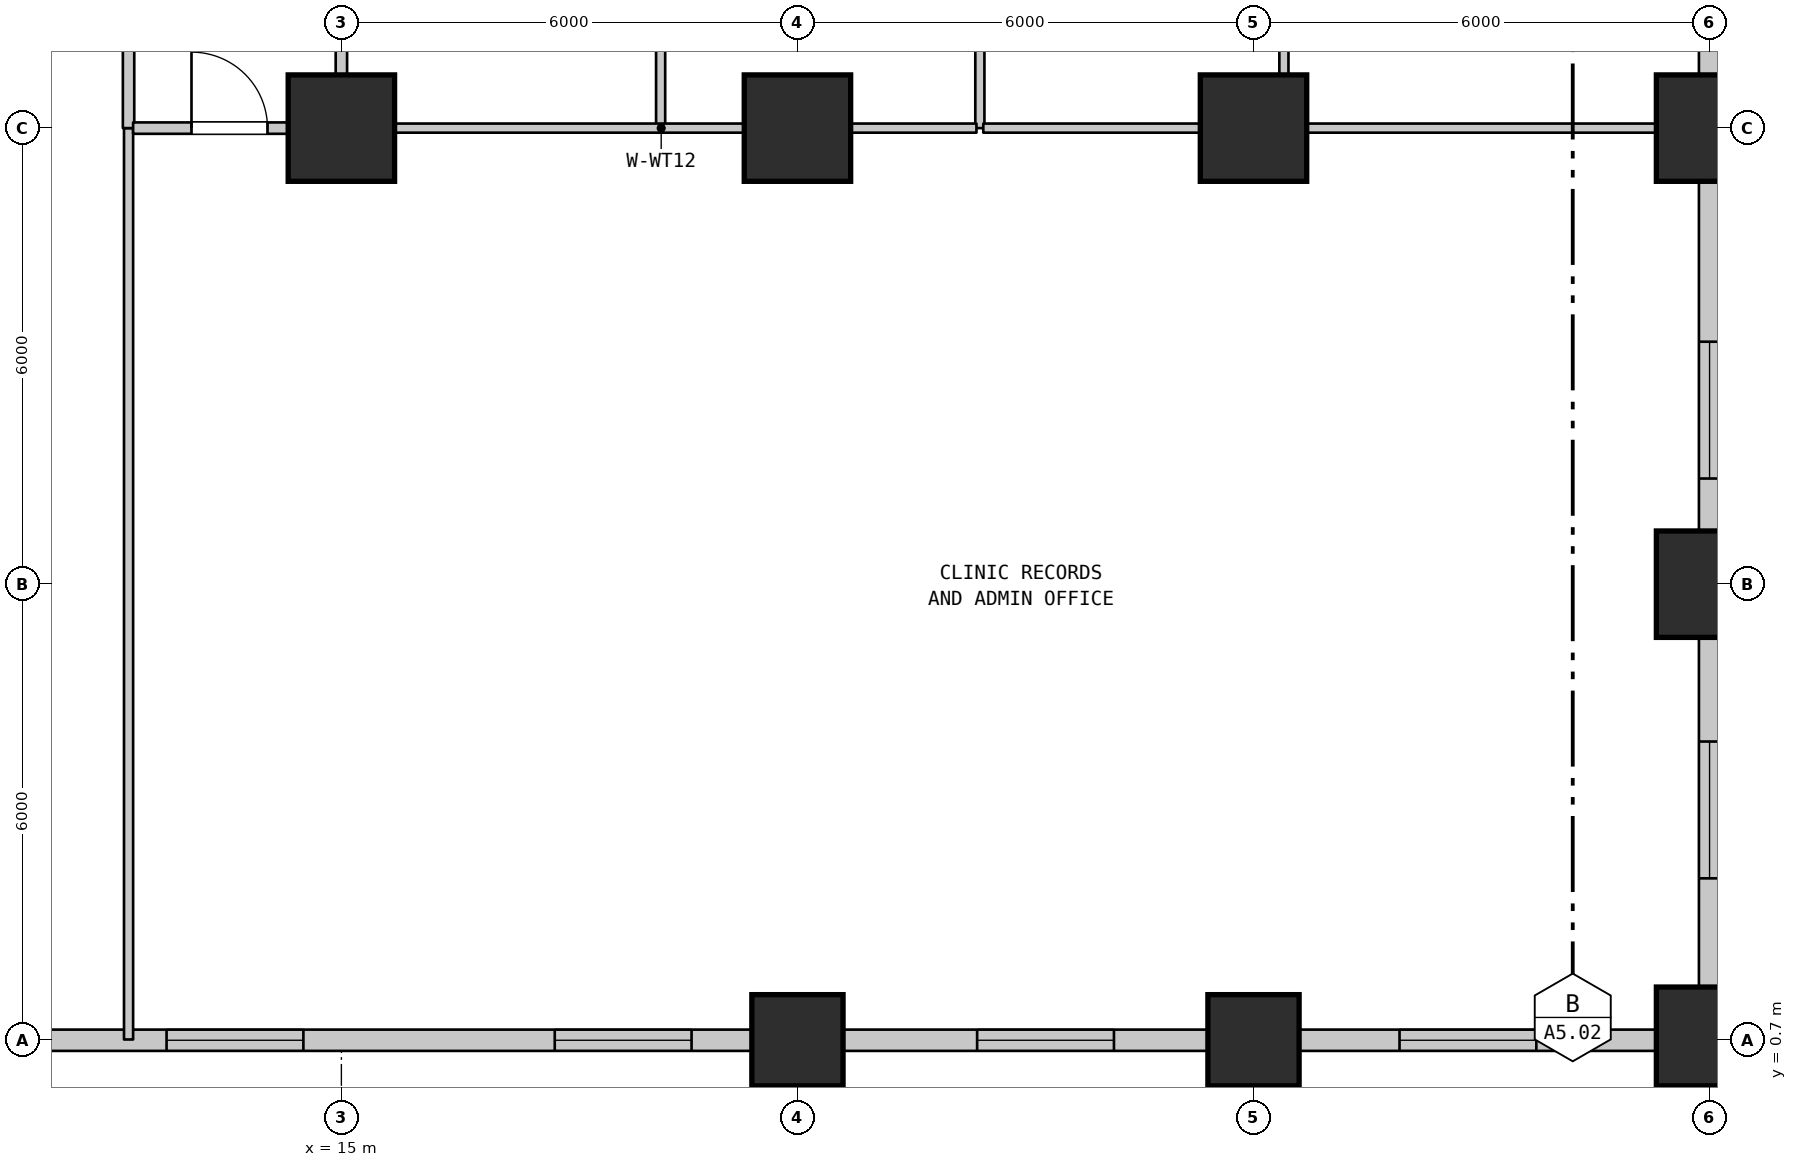
"""IFC4 building model, lengths in metres.
Left out: names, types, materials, properties, quantities, classifications, styles, units other than length and angle.
Written with IfcOpenShell. Run it as: python <this file> out.ifc"""

import sys

from ifc_helpers import new_model, si_unit, direction, frame, frame_2d, origin, origin_2d, place, context, subcontext, project, spatial, rectangle, extrude, element, fill, save


model = new_model("IFC4")
c1 = context("Model", 3, precision=1e-05, world=origin(), true_north=direction((0.0, 1.0)))
c2 = subcontext(c1, "Body", "Model", "MODEL_VIEW")
j1 = project(units=[si_unit("LENGTHUNIT", "METRE"), si_unit("PLANEANGLEUNIT", "RADIAN")], contexts=[c1])
p1 = place(None, origin())
s1 = spatial("IfcSite", under=j1, at=p1, CompositionType="ELEMENT")
p2 = place(p1, origin())
s2 = spatial("IfcBuilding", under=s1, at=p2, CompositionType="ELEMENT")
p3 = place(p2, frame((0.0, 0.0, 6.5)))
s3 = spatial("IfcBuildingStorey", under=s2, at=p3, CompositionType="ELEMENT", Elevation=6.5)
p4 = place(p3, frame((15.0, 12.7, 0.0), z_axis=(0.0, 0.0, 1.0), x_axis=(1.0, 0.0, 0.0)))
e1 = element("IfcColumn", 1, at=p4, inside=s3, PredefinedType="COLUMN", context=c2, shape_type="SweptSolid", body=[
    extrude(rectangle(XDim=1.4, YDim=1.4, at=origin_2d()), origin(), (0.0, 0.0, 1.0), 6.5),
])
p5 = place(p3, frame((21.0, 0.7, 0.0), z_axis=(0.0, 0.0, 1.0), x_axis=(1.0, 0.0, 0.0)))
e2 = element("IfcColumn", 2, at=p5, inside=s3, PredefinedType="PILASTER", context=c2, shape_type="SweptSolid", body=[
    extrude(rectangle(XDim=1.2, YDim=1.2, at=origin_2d()), origin(), (0.0, 0.0, 1.0), 6.5),
])
p6 = place(p3, frame((21.0, 12.7, 0.0), z_axis=(0.0, 0.0, 1.0), x_axis=(1.0, 0.0, 0.0)))
e3 = element("IfcColumn", 3, at=p6, inside=s3, PredefinedType="COLUMN", context=c2, shape_type="SweptSolid", body=[
    extrude(rectangle(XDim=1.4, YDim=1.4, at=origin_2d()), origin(), (0.0, 0.0, 1.0), 6.5),
])
p7 = place(p3, frame((27.0, 0.7, 0.0), z_axis=(0.0, 0.0, 1.0), x_axis=(1.0, 0.0, 0.0)))
e4 = element("IfcColumn", 4, at=p7, inside=s3, PredefinedType="PILASTER", context=c2, shape_type="SweptSolid", body=[
    extrude(rectangle(XDim=1.2, YDim=1.2, at=origin_2d()), origin(), (0.0, 0.0, 1.0), 6.5),
])
p8 = place(p3, frame((27.0, 12.7, 0.0), z_axis=(0.0, 0.0, 1.0), x_axis=(1.0, 0.0, 0.0)))
e5 = element("IfcColumn", 5, at=p8, inside=s3, PredefinedType="COLUMN", context=c2, shape_type="SweptSolid", body=[
    extrude(rectangle(XDim=1.4, YDim=1.4, at=origin_2d()), origin(), (0.0, 0.0, 1.0), 6.5),
])
for number, where, z_axis, x_axis in (
    (6, (33.0, 0.7, 0.0), (0.0, 0.0, 1.0), (1.0, 0.0, 0.0)),
    (7, (33.0, 6.7, 0.0), (0.0, 0.0, 1.0), (1.0, 0.0, 0.0)),
    (8, (33.0, 12.7, 0.0), (0.0, 0.0, 1.0), (1.0, 0.0, 0.0)),
):
    element("IfcColumn", number, at=place(p3, frame(where, z_axis=z_axis, x_axis=x_axis)), inside=s3, PredefinedType="PILASTER", context=c2, shape_type="SweptSolid", body=[
        extrude(rectangle(XDim=1.4, YDim=1.4, at=origin_2d()), origin(), (0.0, 0.0, 1.0), 6.5),
    ])
p9 = place(p3, frame((33.0, 0.7, 0.0), z_axis=(0.0, 0.0, 1.0), x_axis=(-1.0, 0.0, 0.0)))
e9 = element("IfcWall", 9, at=p9, inside=s3, PredefinedType="STANDARD", context=c2, shape_type="SweptSolid", body=[
    extrude(rectangle(XDim=28.586, YDim=0.28, at=frame_2d((14.293, 0.0))), origin(), (0.0, 0.0, 1.0), 6.17),
])
p10 = place(p9, frame((2.279, 0.0, 0.95)))
e10 = element("IfcOpeningElement", 10, at=p10, cuts=e9, PredefinedType="OPENING", context=c2, shape_type="SweptSolid", body=[
    extrude(rectangle(XDim=1.8, YDim=1.8, at=frame_2d((0.9, 0.9))), frame((0.0, 0.15, 0.0), z_axis=(0.0, -1.0, 0.0), x_axis=(1.0, 0.0, 0.0)), (0.0, 0.0, 1.0), 0.3),
])
p11 = place(p9, frame((7.836, 0.0, 0.95)))
e11 = element("IfcOpeningElement", 11, at=p11, cuts=e9, PredefinedType="OPENING", context=c2, shape_type="SweptSolid", body=[
    extrude(rectangle(XDim=1.8, YDim=1.8, at=frame_2d((0.9, 0.9))), frame((0.0, 0.15, 0.0), z_axis=(0.0, -1.0, 0.0), x_axis=(1.0, 0.0, 0.0)), (0.0, 0.0, 1.0), 0.3),
])
p12 = place(p9, frame((13.393, 0.0, 0.95)))
e12 = element("IfcOpeningElement", 12, at=p12, cuts=e9, PredefinedType="OPENING", context=c2, shape_type="SweptSolid", body=[
    extrude(rectangle(XDim=1.8, YDim=1.8, at=frame_2d((0.9, 0.9))), frame((0.0, 0.15, 0.0), z_axis=(0.0, -1.0, 0.0), x_axis=(1.0, 0.0, 0.0)), (0.0, 0.0, 1.0), 0.3),
])
p13 = place(p9, frame((18.5, 0.0, 0.95)))
e13 = element("IfcOpeningElement", 13, at=p13, cuts=e9, PredefinedType="OPENING", context=c2, shape_type="SweptSolid", body=[
    extrude(rectangle(XDim=1.8, YDim=1.8, at=frame_2d((0.9, 0.9))), frame((0.0, 0.15, 0.0), z_axis=(0.0, -1.0, 0.0), x_axis=(1.0, 0.0, 0.0)), (0.0, 0.0, 1.0), 0.3),
])
p14 = place(p9, frame((24.507, 0.0, 0.95)))
e14 = element("IfcOpeningElement", 14, at=p14, cuts=e9, PredefinedType="OPENING", context=c2, shape_type="SweptSolid", body=[
    extrude(rectangle(XDim=1.8, YDim=1.8, at=frame_2d((0.9, 0.9))), frame((0.0, 0.15, 0.0), z_axis=(0.0, -1.0, 0.0), x_axis=(1.0, 0.0, 0.0)), (0.0, 0.0, 1.0), 0.3),
])
p15 = place(p3, frame((12.2, 0.71, 0.0), z_axis=(0.0, 0.0, 1.0), x_axis=(0.0, 1.0, 0.0)))
e15 = element("IfcWall", 15, at=p15, inside=s3, PredefinedType="PARTITIONING", context=c2, shape_type="SweptSolid", body=[
    extrude(rectangle(XDim=11.99, YDim=0.12, at=frame_2d((5.995, 0.0))), origin(), (0.0, 0.0, 1.0), 6.17),
])
p16 = place(p3, frame((12.2, 12.7, 0.0), z_axis=(0.0, 0.0, 1.0), x_axis=(0.0, 1.0, 0.0)))
e16 = element("IfcWall", 16, at=p16, inside=s3, PredefinedType="STANDARD", context=c2, shape_type="SweptSolid", body=[
    extrude(rectangle(XDim=4.8, YDim=0.15, at=frame_2d((2.4, 0.0))), origin(), (0.0, 0.0, 1.0), 6.17),
])
p17 = place(p16, frame((1.529, 0.0, 0.0)))
e17 = element("IfcOpeningElement", 17, at=p17, cuts=e16, PredefinedType="OPENING", context=c2, shape_type="SweptSolid", body=[
    extrude(rectangle(XDim=1.45, YDim=2.2, at=frame_2d((0.725, 1.1))), frame((0.0, 0.085, 0.0), z_axis=(0.0, -1.0, 0.0), x_axis=(1.0, 0.0, 0.0)), (0.0, 0.0, 1.0), 0.17),
])
p18 = place(p3, frame((15.0, 12.7, 0.0), z_axis=(0.0, 0.0, 1.0), x_axis=(0.0, 1.0, 0.0)))
e18 = element("IfcWall", 18, at=p18, inside=s3, PredefinedType="STANDARD", context=c2, shape_type="SweptSolid", body=[
    extrude(rectangle(XDim=4.8, YDim=0.15, at=frame_2d((2.4, 0.0))), origin(), (0.0, 0.0, 1.0), 5.67),
])
for number, where, z_axis, x_axis in (
    (19, (19.2, 12.7, 0.0), (0.0, 0.0, 1.0), (0.0, 1.0, 0.0)),
    (20, (23.4, 12.7, 0.0), (0.0, 0.0, 1.0), (0.0, 1.0, 0.0)),
    (21, (27.4, 12.7, 0.0), (0.0, 0.0, 1.0), (0.0, 1.0, 0.0)),
):
    element("IfcWall", number, at=place(p3, frame(where, z_axis=z_axis, x_axis=x_axis)), inside=s3, PredefinedType="PARTITIONING", context=c2, shape_type="SweptSolid", body=[
        extrude(rectangle(XDim=4.8, YDim=0.12, at=frame_2d((2.4, 0.0))), origin(), (0.0, 0.0, 1.0), 6.17),
    ])
p19 = place(p3, frame((12.26, 12.7, 0.0), z_axis=(0.0, 0.0, 1.0), x_axis=(1.0, 0.0, 0.0)))
e22 = element("IfcWall", 22, at=p19, inside=s3, PredefinedType="STANDARD", context=c2, shape_type="SweptSolid", body=[
    extrude(rectangle(XDim=2.68, YDim=0.15, at=frame_2d((1.34, 0.0))), origin(), (0.0, 0.0, 1.0), 6.17),
])
p20 = place(p19, frame((0.768, 0.0, 0.0)))
e23 = element("IfcOpeningElement", 23, at=p20, cuts=e22, PredefinedType="OPENING", context=c2, shape_type="SweptSolid", body=[
    extrude(rectangle(XDim=1.0, YDim=2.15, at=frame_2d((0.5, 1.075))), frame((0.0, 0.085, 0.0), z_axis=(0.0, -1.0, 0.0), x_axis=(1.0, 0.0, 0.0)), (0.0, 0.0, 1.0), 0.17),
])
p21 = place(p3, frame((15.06, 12.7, 0.0), z_axis=(0.0, 0.0, 1.0), x_axis=(1.0, 0.0, 0.0)))
e24 = element("IfcWall", 24, at=p21, inside=s3, PredefinedType="PARTITIONING", context=c2, shape_type="SweptSolid", body=[
    extrude(rectangle(XDim=8.295, YDim=0.12, at=frame_2d((4.147, 0.0))), origin(), (0.0, 0.0, 1.0), 6.17),
])
p22 = place(p3, frame((23.445, 12.7, 0.0), z_axis=(0.0, 0.0, 1.0), x_axis=(1.0, 0.0, 0.0)))
e25 = element("IfcWall", 25, at=p22, inside=s3, PredefinedType="PARTITIONING", context=c2, shape_type="SweptSolid", body=[
    extrude(rectangle(XDim=3.91, YDim=0.12, at=frame_2d((1.955, 0.0))), origin(), (0.0, 0.0, 1.0), 6.17),
])
p23 = place(p3, frame((27.445, 12.7, 0.0), z_axis=(0.0, 0.0, 1.0), x_axis=(1.0, 0.0, 0.0)))
e26 = element("IfcWall", 26, at=p23, inside=s3, PredefinedType="PARTITIONING", context=c2, shape_type="SweptSolid", body=[
    extrude(rectangle(XDim=5.545, YDim=0.12, at=frame_2d((2.772, 0.0))), origin(), (0.0, 0.0, 1.0), 6.17),
])
p24 = place(p3, frame((33.0, 27.9, 0.0), z_axis=(0.0, 0.0, 1.0), x_axis=(0.0, -1.0, 0.0)))
e27 = element("IfcWall", 27, at=p24, inside=s3, PredefinedType="STANDARD", context=c2, shape_type="SweptSolid", body=[
    extrude(rectangle(XDim=27.2, YDim=0.28, at=frame_2d((13.6, 0.0))), origin(), (0.0, 0.0, 1.0), 5.67),
])
p25 = place(p24, frame((1.78, 0.0, 0.95)))
e28 = element("IfcOpeningElement", 28, at=p25, cuts=e27, PredefinedType="OPENING", context=c2, shape_type="SweptSolid", body=[
    extrude(rectangle(XDim=1.8, YDim=1.8, at=frame_2d((0.9, 0.9))), frame((0.0, 0.15, 0.0), z_axis=(0.0, -1.0, 0.0), x_axis=(1.0, 0.0, 0.0)), (0.0, 0.0, 1.0), 0.3),
])
p26 = place(p24, frame((6.64, 0.0, 0.95)))
e29 = element("IfcOpeningElement", 29, at=p26, cuts=e27, PredefinedType="OPENING", context=c2, shape_type="SweptSolid", body=[
    extrude(rectangle(XDim=1.8, YDim=1.8, at=frame_2d((0.9, 0.9))), frame((0.0, 0.15, 0.0), z_axis=(0.0, -1.0, 0.0), x_axis=(1.0, 0.0, 0.0)), (0.0, 0.0, 1.0), 0.3),
])
p27 = place(p24, frame((11.9, 0.0, 0.95)))
e30 = element("IfcOpeningElement", 30, at=p27, cuts=e27, PredefinedType="OPENING", context=c2, shape_type="SweptSolid", body=[
    extrude(rectangle(XDim=1.8, YDim=1.8, at=frame_2d((0.9, 0.9))), frame((0.0, 0.15, 0.0), z_axis=(0.0, -1.0, 0.0), x_axis=(1.0, 0.0, 0.0)), (0.0, 0.0, 1.0), 0.3),
])
p28 = place(p24, frame((18.01, 0.0, 0.95)))
e31 = element("IfcOpeningElement", 31, at=p28, cuts=e27, PredefinedType="OPENING", context=c2, shape_type="SweptSolid", body=[
    extrude(rectangle(XDim=1.8, YDim=1.8, at=frame_2d((0.9, 0.9))), frame((0.0, 0.15, 0.0), z_axis=(0.0, -1.0, 0.0), x_axis=(1.0, 0.0, 0.0)), (0.0, 0.0, 1.0), 0.3),
])
p29 = place(p24, frame((23.27, 0.0, 0.95)))
e32 = element("IfcOpeningElement", 32, at=p29, cuts=e27, PredefinedType="OPENING", context=c2, shape_type="SweptSolid", body=[
    extrude(rectangle(XDim=1.8, YDim=1.8, at=frame_2d((0.9, 0.9))), frame((0.0, 0.15, 0.0), z_axis=(0.0, -1.0, 0.0), x_axis=(1.0, 0.0, 0.0)), (0.0, 0.0, 1.0), 0.3),
])
p30 = place(p28, origin())
e33 = element("IfcWindow", 33, at=p30, inside=s3, PartitioningType="DOUBLE_PANEL_VERTICAL", PredefinedType="WINDOW", context=c2, shape_type="SweptSolid", body=[
    extrude(rectangle(XDim=1.8, YDim=1.8, at=frame_2d((0.9, 0.9))), frame((0.0, 0.03, 0.0), z_axis=(0.0, -1.0, 0.0), x_axis=(1.0, 0.0, 0.0)), (0.0, 0.0, 1.0), 0.06),
])
fill(e31, e33)
p31 = place(p29, origin())
e34 = element("IfcWindow", 34, at=p31, inside=s3, PartitioningType="DOUBLE_PANEL_VERTICAL", PredefinedType="WINDOW", context=c2, shape_type="SweptSolid", body=[
    extrude(rectangle(XDim=1.8, YDim=1.8, at=frame_2d((0.9, 0.9))), frame((0.0, 0.03, 0.0), z_axis=(0.0, -1.0, 0.0), x_axis=(1.0, 0.0, 0.0)), (0.0, 0.0, 1.0), 0.06),
])
fill(e32, e34)
p32 = place(p10, origin())
e35 = element("IfcWindow", 35, at=p32, inside=s3, PartitioningType="DOUBLE_PANEL_VERTICAL", PredefinedType="WINDOW", context=c2, shape_type="SweptSolid", body=[
    extrude(rectangle(XDim=1.8, YDim=1.8, at=frame_2d((0.9, 0.9))), frame((0.0, 0.03, 0.0), z_axis=(0.0, -1.0, 0.0), x_axis=(1.0, 0.0, 0.0)), (0.0, 0.0, 1.0), 0.06),
])
fill(e10, e35)
p33 = place(p11, origin())
e36 = element("IfcWindow", 36, at=p33, inside=s3, PartitioningType="DOUBLE_PANEL_VERTICAL", PredefinedType="WINDOW", context=c2, shape_type="SweptSolid", body=[
    extrude(rectangle(XDim=1.8, YDim=1.8, at=frame_2d((0.9, 0.9))), frame((0.0, 0.03, 0.0), z_axis=(0.0, -1.0, 0.0), x_axis=(1.0, 0.0, 0.0)), (0.0, 0.0, 1.0), 0.06),
])
fill(e11, e36)
p34 = place(p12, origin())
e37 = element("IfcWindow", 37, at=p34, inside=s3, PartitioningType="DOUBLE_PANEL_VERTICAL", PredefinedType="WINDOW", context=c2, shape_type="SweptSolid", body=[
    extrude(rectangle(XDim=1.8, YDim=1.8, at=frame_2d((0.9, 0.9))), frame((0.0, 0.03, 0.0), z_axis=(0.0, -1.0, 0.0), x_axis=(1.0, 0.0, 0.0)), (0.0, 0.0, 1.0), 0.06),
])
fill(e12, e37)
p35 = place(p13, origin())
e38 = element("IfcWindow", 38, at=p35, inside=s3, PartitioningType="DOUBLE_PANEL_VERTICAL", PredefinedType="WINDOW", context=c2, shape_type="SweptSolid", body=[
    extrude(rectangle(XDim=1.8, YDim=1.8, at=frame_2d((0.9, 0.9))), frame((0.0, 0.03, 0.0), z_axis=(0.0, -1.0, 0.0), x_axis=(1.0, 0.0, 0.0)), (0.0, 0.0, 1.0), 0.06),
])
fill(e13, e38)
p36 = place(p20, origin())
e39 = element("IfcDoor", 39, at=p36, inside=s3, OperationType="SINGLE_SWING_LEFT", PredefinedType="DOOR", context=c2, shape_type="SweptSolid", body=[
    extrude(rectangle(XDim=1.0, YDim=2.15, at=frame_2d((0.5, 1.075))), frame((0.0, 0.025, 0.0), z_axis=(0.0, -1.0, 0.0), x_axis=(1.0, 0.0, 0.0)), (0.0, 0.0, 1.0), 0.05),
])
fill(e23, e39)
save(model, sys.argv[1])
